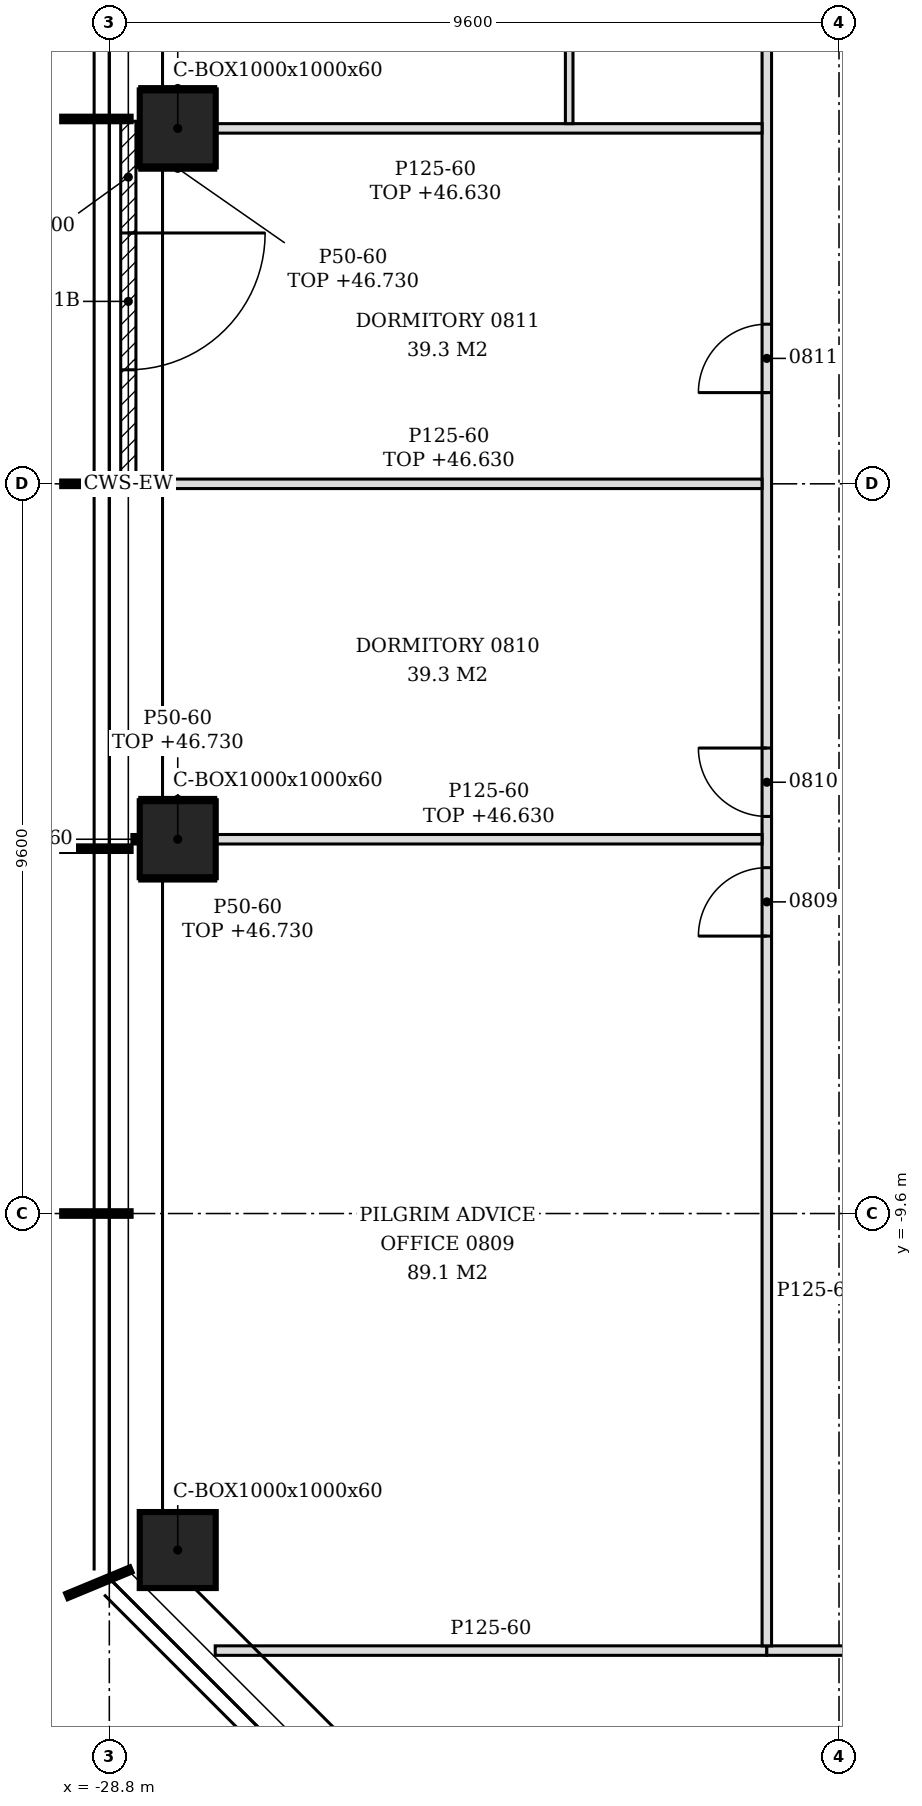
"""IFC4 building model, lengths in metres.
Left out: names, types, materials, properties, quantities, classifications, styles, units other than length and angle.
Written with IfcOpenShell. Run it as: python <this file> out.ifc"""

import sys

from ifc_helpers import new_model, si_unit, direction, frame, frame_2d, origin, origin_2d, place, context, subcontext, project, spatial, polyline, rectangle, hollow_rectangle, outline, extrude, element, fill, save


model = new_model("IFC4")
c1 = context("Model", 3, precision=1e-05, world=origin(), true_north=direction((0.0, 1.0)))
c2 = subcontext(c1, "Body", "Model", "MODEL_VIEW")
j1 = project(units=[si_unit("LENGTHUNIT", "METRE"), si_unit("PLANEANGLEUNIT", "RADIAN")], contexts=[c1])
p1 = place(None, origin())
s1 = spatial("IfcSite", under=j1, at=p1, CompositionType="ELEMENT")
p2 = place(p1, origin())
s2 = spatial("IfcBuilding", under=s1, at=p2, CompositionType="ELEMENT")
p3 = place(p2, frame((0.0, 0.0, 43.8)))
s3 = spatial("IfcBuildingStorey", under=s2, at=p3, CompositionType="ELEMENT", Elevation=43.8)
for number, where, z_axis, x_axis in (
    (1, (-27.9, 4.676, -0.15), (0.0, 0.0, 1.0), (1.0, 0.0, 0.0)),
    (2, (-27.9, -4.676, -0.15), (0.0, 0.0, 1.0), (1.0, 0.0, 0.0)),
    (3, (-27.9, -14.027, -0.15), (0.0, 0.0, 1.0), (1.0, 0.0, 0.0)),
):
    element("IfcColumn", number, at=place(p3, frame(where, z_axis=z_axis, x_axis=x_axis)), inside=s3, PredefinedType="COLUMN", context=c2, shape_type="SweptSolid", body=[
        extrude(hollow_rectangle(XDim=1.0, YDim=1.0, WallThickness=0.06, at=origin_2d()), origin(), (0.0, 0.0, 1.0), 3.6),
    ])
p4 = place(p3, frame((-28.55, 4.77, 0.0), z_axis=(0.0, 0.0, 1.0), x_axis=(0.0, -1.0, 0.0)))
e4 = element("IfcWall", 4, at=p4, inside=s3, PredefinedType="NOTDEFINED", context=c2, shape_type="SweptSolid", body=[
    extrude(rectangle(XDim=4.74, YDim=0.2, at=frame_2d((2.37, 0.0))), origin(), (0.0, 0.0, 1.0), 3.45),
])
p5 = place(p4, frame((1.47, 0.0, 0.0)))
e5 = element("IfcOpeningElement", 5, at=p5, cuts=e4, PredefinedType="OPENING", context=c2, shape_type="SweptSolid", body=[
    extrude(rectangle(XDim=1.8, YDim=2.4, at=frame_2d((0.9, 1.2))), frame((0.0, 0.11, 0.0), z_axis=(0.0, -1.0, 0.0), x_axis=(1.0, 0.0, 0.0)), (0.0, 0.0, 1.0), 0.22),
])
p6 = place(p3, frame((-27.407, -15.35, 0.0), z_axis=(0.0, 0.0, 1.0), x_axis=(1.0, 0.0, 0.0)))
e6 = element("IfcWall", 6, at=p6, inside=s3, PredefinedType="PARTITIONING", context=c2, shape_type="SweptSolid", body=[
    extrude(outline(polyline([(0.0, 0.0), (7.257, 0.0), (7.257, 3.45), (1.104, 3.45), (1.102, 2.93), (0.555, 2.93), (0.553, 3.45), (0.0, 3.45), (0.0, 0.0)])), frame((0.0, 0.062, 0.0), z_axis=(0.0, -1.0, 0.0), x_axis=(1.0, 0.0, 0.0)), (0.0, 0.0, 1.0), 0.125),
])
p7 = place(p3, frame((-20.15, -15.35, 0.0), z_axis=(0.0, 0.0, 1.0), x_axis=(1.0, 0.0, 0.0)))
e7 = element("IfcWall", 7, at=p7, inside=s3, PredefinedType="PARTITIONING", context=c2, shape_type="SweptSolid", body=[
    extrude(outline(polyline([(0.0, 0.0), (39.287, 0.0), (39.288, 2.73), (39.2, 2.73), (39.198, 3.45), (27.5, 3.45), (27.498, 2.73), (27.2, 2.73), (27.198, 3.45), (15.5, 3.45), (15.498, 2.73), (15.2, 2.73), (15.198, 3.45), (5.9, 3.45), (5.898, 2.93), (5.6, 2.93), (5.598, 3.45), (0.0, 3.45), (0.0, 0.0)])), frame((0.0, 0.062, 0.0), z_axis=(0.0, -1.0, 0.0), x_axis=(1.0, 0.0, 0.0)), (0.0, 0.0, 1.0), 0.125),
])
p8 = place(p7, frame((4.55, 0.0, 0.0)))
e8 = element("IfcOpeningElement", 8, at=p8, cuts=e7, PredefinedType="OPENING", context=c2, shape_type="SweptSolid", body=[
    extrude(rectangle(XDim=0.9, YDim=2.1, at=frame_2d((0.45, 1.05))), frame((0.0, 0.073, 0.0), z_axis=(0.0, -1.0, 0.0), x_axis=(1.0, 0.0, 0.0)), (0.0, 0.0, 1.0), 0.145),
])
p9 = place(p7, frame((7.136, 0.0, 0.0)))
e9 = element("IfcOpeningElement", 9, at=p9, cuts=e7, PredefinedType="OPENING", context=c2, shape_type="SweptSolid", body=[
    extrude(rectangle(XDim=0.9, YDim=2.1, at=frame_2d((0.45, 1.05))), frame((0.0, 0.073, 0.0), z_axis=(0.0, -1.0, 0.0), x_axis=(1.0, 0.0, 0.0)), (0.0, 0.0, 1.0), 0.145),
])
p10 = place(p7, frame((14.15, 0.0, 0.0)))
e10 = element("IfcOpeningElement", 10, at=p10, cuts=e7, PredefinedType="OPENING", context=c2, shape_type="SweptSolid", body=[
    extrude(rectangle(XDim=0.9, YDim=2.1, at=frame_2d((0.45, 1.05))), frame((0.0, 0.073, 0.0), z_axis=(0.0, -1.0, 0.0), x_axis=(1.0, 0.0, 0.0)), (0.0, 0.0, 1.0), 0.145),
])
p11 = place(p7, frame((16.55, 0.0, 0.0)))
e11 = element("IfcOpeningElement", 11, at=p11, cuts=e7, PredefinedType="OPENING", context=c2, shape_type="SweptSolid", body=[
    extrude(rectangle(XDim=0.9, YDim=2.1, at=frame_2d((0.45, 1.05))), frame((0.0, 0.073, 0.0), z_axis=(0.0, -1.0, 0.0), x_axis=(1.0, 0.0, 0.0)), (0.0, 0.0, 1.0), 0.145),
])
p12 = place(p7, frame((21.35, 0.0, 0.0)))
e12 = element("IfcOpeningElement", 12, at=p12, cuts=e7, PredefinedType="OPENING", context=c2, shape_type="SweptSolid", body=[
    extrude(rectangle(XDim=0.9, YDim=2.1, at=frame_2d((0.45, 1.05))), frame((0.0, 0.073, 0.0), z_axis=(0.0, -1.0, 0.0), x_axis=(1.0, 0.0, 0.0)), (0.0, 0.0, 1.0), 0.145),
])
p13 = place(p7, frame((28.364, 0.0, 0.0)))
e13 = element("IfcOpeningElement", 13, at=p13, cuts=e7, PredefinedType="OPENING", context=c2, shape_type="SweptSolid", body=[
    extrude(rectangle(XDim=0.9, YDim=2.1, at=frame_2d((0.45, 1.05))), frame((0.0, 0.073, 0.0), z_axis=(0.0, -1.0, 0.0), x_axis=(1.0, 0.0, 0.0)), (0.0, 0.0, 1.0), 0.145),
])
p14 = place(p7, frame((32.35, 0.0, 0.0)))
e14 = element("IfcOpeningElement", 14, at=p14, cuts=e7, PredefinedType="OPENING", context=c2, shape_type="SweptSolid", body=[
    extrude(rectangle(XDim=0.9, YDim=2.1, at=frame_2d((0.45, 1.05))), frame((0.0, 0.073, 0.0), z_axis=(0.0, -1.0, 0.0), x_axis=(1.0, 0.0, 0.0)), (0.0, 0.0, 1.0), 0.145),
])
p15 = place(p7, frame((37.35, 0.0, 0.0)))
e15 = element("IfcOpeningElement", 15, at=p15, cuts=e7, PredefinedType="OPENING", context=c2, shape_type="SweptSolid", body=[
    extrude(rectangle(XDim=0.9, YDim=2.1, at=frame_2d((0.45, 1.05))), frame((0.0, 0.073, 0.0), z_axis=(0.0, -1.0, 0.0), x_axis=(1.0, 0.0, 0.0)), (0.0, 0.0, 1.0), 0.145),
])
p16 = place(p3, frame((-20.15, -15.288, 0.0), z_axis=(0.0, 0.0, 1.0), x_axis=(0.0, 1.0, 0.0)))
e16 = element("IfcWall", 16, at=p16, inside=s3, PredefinedType="PARTITIONING", context=c2, shape_type="SweptSolid", body=[
    extrude(outline(polyline([(0.0, 0.0), (37.876, 0.0), (37.876, 3.45), (37.622, 3.45), (37.62, 2.63), (36.507, 2.63), (36.505, 3.45), (34.583, 3.45), (34.581, 2.98), (34.393, 2.98), (34.39, 3.45), (29.798, 3.45), (29.795, 2.83), (29.577, 2.83), (29.575, 3.45), (24.998, 3.45), (24.996, 2.83), (24.778, 2.83), (24.775, 3.45), (20.198, 3.45), (20.196, 2.83), (19.978, 2.83), (19.976, 3.45), (15.397, 3.45), (15.396, 2.83), (15.177, 2.83), (15.176, 3.45), (10.597, 3.45), (10.595, 2.83), (10.377, 2.83), (10.375, 3.45), (5.798, 3.45), (5.795, 2.83), (5.577, 2.83), (5.575, 3.45), (0.998, 3.45), (0.996, 2.83), (0.778, 2.83), (0.775, 3.45), (0.0, 3.45), (0.0, 0.0)])), frame((0.0, 0.062, 0.0), z_axis=(0.0, -1.0, 0.0), x_axis=(1.0, 0.0, 0.0)), (0.0, 0.0, 1.0), 0.125),
])
p17 = place(p16, frame((9.337, 0.0, 0.0)))
e17 = element("IfcOpeningElement", 17, at=p17, cuts=e16, PredefinedType="OPENING", context=c2, shape_type="SweptSolid", body=[
    extrude(rectangle(XDim=0.9, YDim=2.1, at=frame_2d((0.45, 1.05))), frame((0.0, 0.073, 0.0), z_axis=(0.0, -1.0, 0.0), x_axis=(1.0, 0.0, 0.0)), (0.0, 0.0, 1.0), 0.145),
])
p18 = place(p16, frame((10.912, 0.0, 0.0)))
e18 = element("IfcOpeningElement", 18, at=p18, cuts=e16, PredefinedType="OPENING", context=c2, shape_type="SweptSolid", body=[
    extrude(rectangle(XDim=0.9, YDim=2.1, at=frame_2d((0.45, 1.05))), frame((0.0, 0.073, 0.0), z_axis=(0.0, -1.0, 0.0), x_axis=(1.0, 0.0, 0.0)), (0.0, 0.0, 1.0), 0.145),
])
p19 = place(p16, frame((16.488, 0.0, 0.0)))
e19 = element("IfcOpeningElement", 19, at=p19, cuts=e16, PredefinedType="OPENING", context=c2, shape_type="SweptSolid", body=[
    extrude(rectangle(XDim=0.9, YDim=2.1, at=frame_2d((0.45, 1.05))), frame((0.0, 0.073, 0.0), z_axis=(0.0, -1.0, 0.0), x_axis=(1.0, 0.0, 0.0)), (0.0, 0.0, 1.0), 0.145),
])
p20 = place(p16, frame((23.664, 0.0, 0.0)))
e20 = element("IfcOpeningElement", 20, at=p20, cuts=e16, PredefinedType="OPENING", context=c2, shape_type="SweptSolid", body=[
    extrude(rectangle(XDim=0.9, YDim=2.1, at=frame_2d((0.45, 1.05))), frame((0.0, 0.073, 0.0), z_axis=(0.0, -1.0, 0.0), x_axis=(1.0, 0.0, 0.0)), (0.0, 0.0, 1.0), 0.145),
])
p21 = place(p16, frame((26.387, 0.0, 0.0)))
e21 = element("IfcOpeningElement", 21, at=p21, cuts=e16, PredefinedType="OPENING", context=c2, shape_type="SweptSolid", body=[
    extrude(rectangle(XDim=0.9, YDim=2.1, at=frame_2d((0.45, 1.05))), frame((0.0, 0.073, 0.0), z_axis=(0.0, -1.0, 0.0), x_axis=(1.0, 0.0, 0.0)), (0.0, 0.0, 1.0), 0.145),
])
p22 = place(p16, frame((29.615, 0.0, 0.0)))
e22 = element("IfcOpeningElement", 22, at=p22, cuts=e16, PredefinedType="OPENING", context=c2, shape_type="SweptSolid", body=[
    extrude(rectangle(XDim=0.9, YDim=2.1, at=frame_2d((0.45, 1.05))), frame((0.0, 0.073, 0.0), z_axis=(0.0, -1.0, 0.0), x_axis=(1.0, 0.0, 0.0)), (0.0, 0.0, 1.0), 0.145),
])
p23 = place(p3, frame((-28.503, -4.676, 0.0), z_axis=(0.0, 0.0, 1.0), x_axis=(1.0, 0.0, 0.0)))
e23 = element("IfcWall", 23, at=p23, inside=s3, PredefinedType="PARTITIONING", context=c2, shape_type="SweptSolid", body=[
    extrude(rectangle(XDim=0.103, YDim=0.125, at=frame_2d((0.052, 0.0))), origin(), (0.0, 0.0, 1.0), 3.45),
])
p24 = place(p3, frame((-27.4, -4.676, 0.0), z_axis=(0.0, 0.0, 1.0), x_axis=(1.0, 0.0, 0.0)))
e24 = element("IfcWall", 24, at=p24, inside=s3, PredefinedType="PARTITIONING", context=c2, shape_type="SweptSolid", body=[
    extrude(rectangle(XDim=7.188, YDim=0.125, at=frame_2d((3.594, 0.0))), origin(), (0.0, 0.0, 1.0), 2.83),
])
p25 = place(p3, frame((-28.45, 0.0, 0.0), z_axis=(0.0, 0.0, 1.0), x_axis=(1.0, 0.0, 0.0)))
e25 = element("IfcWall", 25, at=p25, inside=s3, PredefinedType="PARTITIONING", context=c2, shape_type="SweptSolid", body=[
    extrude(rectangle(XDim=8.238, YDim=0.125, at=frame_2d((4.119, 0.0))), origin(), (0.0, 0.0, 1.0), 2.83),
])
p26 = place(p3, frame((-27.4, 4.676, 0.0), z_axis=(0.0, 0.0, 1.0), x_axis=(1.0, 0.0, 0.0)))
e26 = element("IfcWall", 26, at=p26, inside=s3, PredefinedType="PARTITIONING", context=c2, shape_type="SweptSolid", body=[
    extrude(rectangle(XDim=7.188, YDim=0.125, at=frame_2d((3.594, 0.0))), origin(), (0.0, 0.0, 1.0), 2.83),
])
p27 = place(p3, frame((-22.75, 4.739, 0.0), z_axis=(0.0, 0.0, 1.0), x_axis=(0.0, 1.0, 0.0)))
e27 = element("IfcWall", 27, at=p27, inside=s3, PredefinedType="PARTITIONING", context=c2, shape_type="SweptSolid", body=[
    extrude(outline(polyline([(0.0, 0.0), (2.287, 0.0), (2.288, 3.45), (0.171, 3.45), (0.169, 2.83), (0.0, 2.83), (0.0, 0.0)])), frame((0.0, 0.05, 0.0), z_axis=(0.0, -1.0, 0.0), x_axis=(1.0, 0.0, 0.0)), (0.0, 0.0, 1.0), 0.1),
])
for number, where, z_axis, x_axis in (
    (28, (-28.4, -4.151, 0.0), (0.0, 0.0, 1.0), (1.0, 0.0, 0.0)),
    (29, (-28.4, -5.201, 0.0), (0.0, 0.0, 1.0), (1.0, 0.0, 0.0)),
    (30, (-28.4, 5.201, 0.0), (0.0, 0.0, 1.0), (1.0, 0.0, 0.0)),
    (31, (-28.4, 4.151, 0.0), (0.0, 0.0, 1.0), (1.0, 0.0, 0.0)),
):
    element("IfcWall", number, at=place(p3, frame(where, z_axis=z_axis, x_axis=x_axis)), inside=s3, PredefinedType="PARTITIONING", context=c2, shape_type="SweptSolid", body=[
        extrude(rectangle(XDim=1.0, YDim=0.05, at=frame_2d((0.5, 0.0))), origin(), (0.0, 0.0, 1.0), 2.93),
    ])
p28 = place(p5, origin())
e32 = element("IfcDoor", 32, at=p28, inside=s3, OperationType="SINGLE_SWING_LEFT", PredefinedType="DOOR", context=c2, shape_type="SweptSolid", body=[
    extrude(rectangle(XDim=1.8, YDim=2.4, at=frame_2d((0.9, 1.2))), frame((0.0, 0.025, 0.0), z_axis=(0.0, -1.0, 0.0), x_axis=(1.0, 0.0, 0.0)), (0.0, 0.0, 1.0), 0.05),
])
fill(e5, e32)
p29 = place(p17, origin())
e33 = element("IfcDoor", 33, at=p29, inside=s3, OperationType="SINGLE_SWING_LEFT", PredefinedType="DOOR", context=c2, shape_type="SweptSolid", body=[
    extrude(rectangle(XDim=0.9, YDim=2.1, at=frame_2d((0.45, 1.05))), frame((0.0, 0.025, 0.0), z_axis=(0.0, -1.0, 0.0), x_axis=(1.0, 0.0, 0.0)), (0.0, 0.0, 1.0), 0.05),
])
fill(e17, e33)
p30 = place(p18, origin())
e34 = element("IfcDoor", 34, at=p30, inside=s3, OperationType="SINGLE_SWING_RIGHT", PredefinedType="DOOR", context=c2, shape_type="SweptSolid", body=[
    extrude(rectangle(XDim=0.9, YDim=2.1, at=frame_2d((0.45, 1.05))), frame((0.0, 0.025, 0.0), z_axis=(0.0, -1.0, 0.0), x_axis=(1.0, 0.0, 0.0)), (0.0, 0.0, 1.0), 0.05),
])
fill(e18, e34)
p31 = place(p19, origin())
e35 = element("IfcDoor", 35, at=p31, inside=s3, OperationType="SINGLE_SWING_LEFT", PredefinedType="DOOR", context=c2, shape_type="SweptSolid", body=[
    extrude(rectangle(XDim=0.9, YDim=2.1, at=frame_2d((0.45, 1.05))), frame((0.0, 0.025, 0.0), z_axis=(0.0, -1.0, 0.0), x_axis=(1.0, 0.0, 0.0)), (0.0, 0.0, 1.0), 0.05),
])
fill(e19, e35)
save(model, sys.argv[1])
